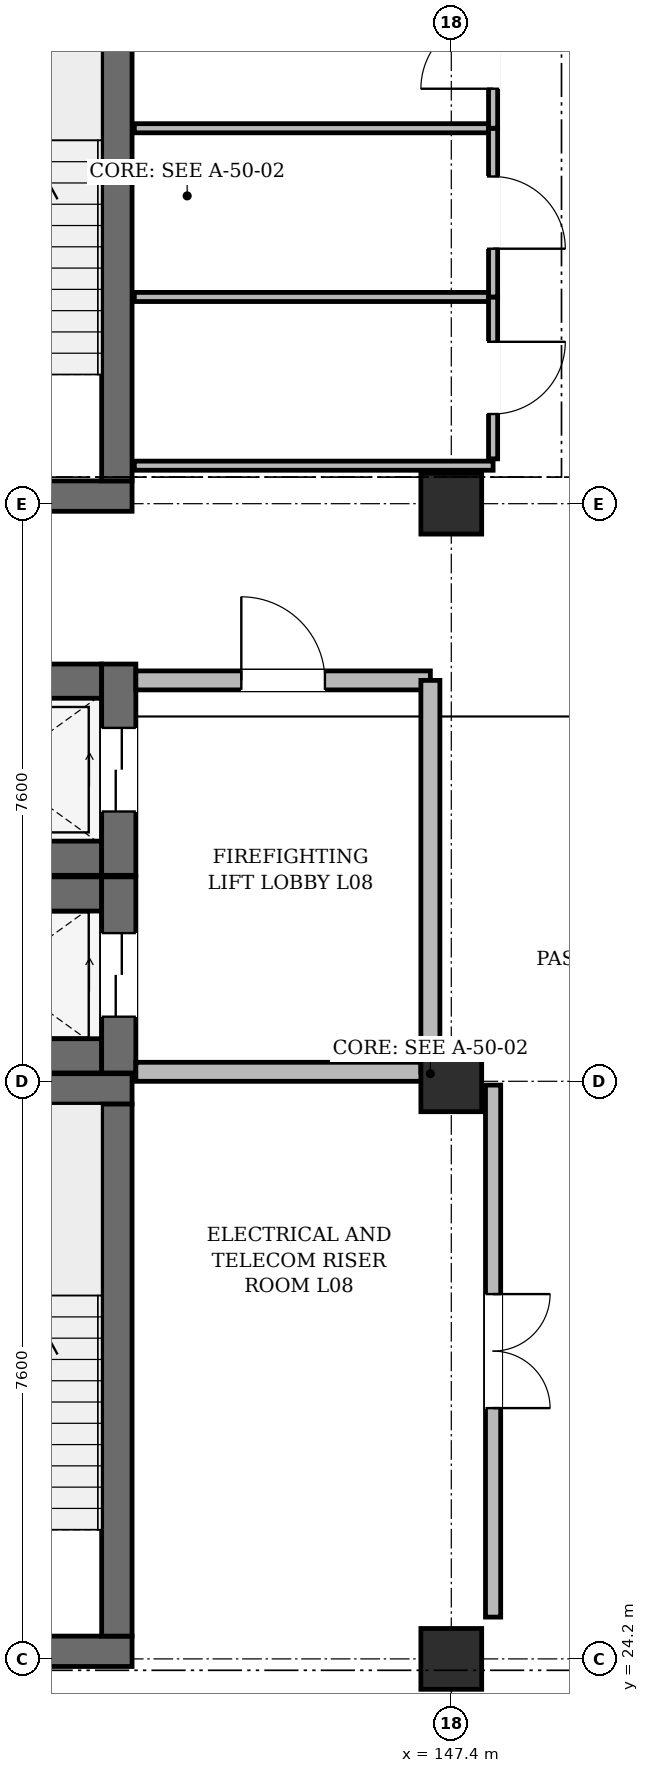
"""IFC4 building model, lengths in metres.
Left out: names, types, materials, properties, quantities, classifications, styles, units other than length and angle.
Written with IfcOpenShell. Run it as: python <this file> out.ifc"""

import sys

from ifc_helpers import new_model, si_unit, direction, frame, frame_2d, origin, origin_2d, place, context, subcontext, project, spatial, rectangle, extrude, element, fill, save


model = new_model("IFC4")
c1 = context("Model", 3, precision=1e-05, world=origin(), true_north=direction((0.0, 1.0)))
c2 = subcontext(c1, "Body", "Model", "MODEL_VIEW")
j1 = project(units=[si_unit("LENGTHUNIT", "METRE"), si_unit("PLANEANGLEUNIT", "RADIAN")], contexts=[c1])
p1 = place(None, origin())
s1 = spatial("IfcSite", under=j1, at=p1, CompositionType="ELEMENT")
p2 = place(p1, origin())
s2 = spatial("IfcBuilding", under=s1, at=p2, CompositionType="ELEMENT")
p3 = place(p2, frame((0.0, 0.0, 36.6)))
s3 = spatial("IfcBuildingStorey", under=s2, at=p3, CompositionType="ELEMENT", Elevation=36.6)
for number, where, z_axis, x_axis in (
    (1, (147.4, 24.2, 0.0), (0.0, 0.0, 1.0), (1.0, 0.0, 0.0)),
    (2, (147.4, 31.8, 0.0), (0.0, 0.0, 1.0), (1.0, 0.0, 0.0)),
    (3, (147.4, 39.4, 0.0), (0.0, 0.0, 1.0), (1.0, 0.0, 0.0)),
):
    element("IfcColumn", number, at=place(p3, frame(where, z_axis=z_axis, x_axis=x_axis)), inside=s3, PredefinedType="COLUMN", context=c2, shape_type="SweptSolid", body=[
        extrude(rectangle(XDim=0.8, YDim=0.8, at=origin_2d()), origin(), (0.0, 0.0, 1.0), 3.95),
    ])
p4 = place(p3, frame((139.4, 24.3, 0.0), z_axis=(0.0, 0.0, 1.0), x_axis=(1.0, 0.0, 0.0)))
e4 = element("IfcWall", 4, at=p4, inside=s3, PredefinedType="SHEAR", context=c2, shape_type="SweptSolid", body=[
    extrude(rectangle(XDim=3.8, YDim=0.4, at=frame_2d((1.9, 0.0))), origin(), (0.0, 0.0, 1.0), 3.95),
])
p5 = place(p4, frame((1.3, 0.0, 0.0)))
e5 = element("IfcOpeningElement", 5, at=p5, cuts=e4, PredefinedType="OPENING", context=c2, shape_type="SweptSolid", body=[
    extrude(rectangle(XDim=1.2, YDim=2.2, at=frame_2d((0.6, 1.1))), frame((0.0, 0.212, 0.0), z_axis=(0.0, -1.0, 0.0), x_axis=(1.0, 0.0, 0.0)), (0.0, 0.0, 1.0), 0.424),
])
p6 = place(p3, frame((139.4, 31.7, 0.0), z_axis=(0.0, 0.0, 1.0), x_axis=(1.0, 0.0, 0.0)))
e6 = element("IfcWall", 6, at=p6, inside=s3, PredefinedType="SHEAR", context=c2, shape_type="SweptSolid", body=[
    extrude(rectangle(XDim=3.8, YDim=0.4, at=frame_2d((1.9, 0.0))), origin(), (0.0, 0.0, 1.0), 3.95),
])
p7 = place(p3, frame((143.0, 24.5, 0.0), z_axis=(0.0, 0.0, 1.0), x_axis=(0.0, 1.0, 0.0)))
e7 = element("IfcWall", 7, at=p7, inside=s3, PredefinedType="SHEAR", context=c2, shape_type="SweptSolid", body=[
    extrude(rectangle(XDim=7.0, YDim=0.4, at=frame_2d((3.5, 0.0))), origin(), (0.0, 0.0, 1.0), 3.95),
])
p8 = place(p3, frame((139.4, 39.5, 0.0), z_axis=(0.0, 0.0, 1.0), x_axis=(1.0, 0.0, 0.0)))
e8 = element("IfcWall", 8, at=p8, inside=s3, PredefinedType="SHEAR", context=c2, shape_type="SweptSolid", body=[
    extrude(rectangle(XDim=3.8, YDim=0.4, at=frame_2d((1.9, 0.0))), origin(), (0.0, 0.0, 1.0), 3.95),
])
p9 = place(p8, frame((1.3, 0.0, 0.0)))
e9 = element("IfcOpeningElement", 9, at=p9, cuts=e8, PredefinedType="OPENING", context=c2, shape_type="SweptSolid", body=[
    extrude(rectangle(XDim=1.2, YDim=2.2, at=frame_2d((0.6, 1.1))), frame((0.0, 0.212, 0.0), z_axis=(0.0, -1.0, 0.0), x_axis=(1.0, 0.0, 0.0)), (0.0, 0.0, 1.0), 0.424),
])
p10 = place(p3, frame((143.0, 39.7, 0.0), z_axis=(0.0, 0.0, 1.0), x_axis=(0.0, 1.0, 0.0)))
e10 = element("IfcWall", 10, at=p10, inside=s3, PredefinedType="SHEAR", context=c2, shape_type="SweptSolid", body=[
    extrude(rectangle(XDim=7.0, YDim=0.4, at=frame_2d((3.5, 0.0))), origin(), (0.0, 0.0, 1.0), 3.95),
])
for number, where, z_axis, x_axis in (
    (11, (140.06, 32.135, 0.0), (0.0, 0.0, 1.0), (1.0, 0.0, 0.0)),
    (12, (140.06, 34.265, 0.0), (0.0, 0.0, 1.0), (1.0, 0.0, 0.0)),
):
    element("IfcWall", number, at=place(p3, frame(where, z_axis=z_axis, x_axis=x_axis)), inside=s3, PredefinedType="SHEAR", context=c2, shape_type="SweptSolid", body=[
        extrude(rectangle(XDim=2.74, YDim=0.45, at=frame_2d((1.37, 0.0))), origin(), (0.0, 0.0, 1.0), 3.95),
    ])
p11 = place(p3, frame((143.025, 31.91, 0.0), z_axis=(0.0, 0.0, 1.0), x_axis=(0.0, 1.0, 0.0)))
e13 = element("IfcWall", 13, at=p11, inside=s3, PredefinedType="SHEAR", context=c2, shape_type="SweptSolid", body=[
    extrude(rectangle(XDim=2.58, YDim=0.45, at=frame_2d((1.29, 0.0))), origin(), (0.0, 0.0, 1.0), 3.95),
])
p12 = place(p11, frame((0.74, 0.0, 0.0)))
e14 = element("IfcOpeningElement", 14, at=p12, cuts=e13, PredefinedType="OPENING", context=c2, shape_type="SweptSolid", body=[
    extrude(rectangle(XDim=1.1, YDim=2.2, at=frame_2d((0.55, 1.1))), frame((0.0, 0.237, 0.0), z_axis=(0.0, -1.0, 0.0), x_axis=(1.0, 0.0, 0.0)), (0.0, 0.0, 1.0), 0.474),
])
for number, where, z_axis, x_axis in (
    (15, (140.06, 34.735, 0.0), (0.0, 0.0, 1.0), (1.0, 0.0, 0.0)),
    (16, (140.06, 37.065, 0.0), (0.0, 0.0, 1.0), (1.0, 0.0, 0.0)),
):
    element("IfcWall", number, at=place(p3, frame(where, z_axis=z_axis, x_axis=x_axis)), inside=s3, PredefinedType="SHEAR", context=c2, shape_type="SweptSolid", body=[
        extrude(rectangle(XDim=2.74, YDim=0.45, at=frame_2d((1.37, 0.0))), origin(), (0.0, 0.0, 1.0), 3.95),
    ])
p13 = place(p3, frame((143.025, 34.51, 0.0), z_axis=(0.0, 0.0, 1.0), x_axis=(0.0, 1.0, 0.0)))
e17 = element("IfcWall", 17, at=p13, inside=s3, PredefinedType="SHEAR", context=c2, shape_type="SweptSolid", body=[
    extrude(rectangle(XDim=2.78, YDim=0.45, at=frame_2d((1.39, 0.0))), origin(), (0.0, 0.0, 1.0), 3.95),
])
p14 = place(p13, frame((0.84, 0.0, 0.0)))
e18 = element("IfcOpeningElement", 18, at=p14, cuts=e17, PredefinedType="OPENING", context=c2, shape_type="SweptSolid", body=[
    extrude(rectangle(XDim=1.1, YDim=2.2, at=frame_2d((0.55, 1.1))), frame((0.0, 0.237, 0.0), z_axis=(0.0, -1.0, 0.0), x_axis=(1.0, 0.0, 0.0)), (0.0, 0.0, 1.0), 0.474),
])
p15 = place(p3, frame((143.25, 37.075, 0.0), z_axis=(0.0, 0.0, 1.0), x_axis=(1.0, 0.0, 0.0)))
e19 = element("IfcWall", 19, at=p15, inside=s3, PredefinedType="SOLIDWALL", context=c2, shape_type="SweptSolid", body=[
    extrude(rectangle(XDim=3.875, YDim=0.25, at=frame_2d((1.938, 0.0))), origin(), (0.0, 0.0, 1.0), 3.805),
])
p16 = place(p15, frame((1.387, 0.0, 0.0)))
e20 = element("IfcOpeningElement", 20, at=p16, cuts=e19, PredefinedType="OPENING", context=c2, shape_type="SweptSolid", body=[
    extrude(rectangle(XDim=1.1, YDim=2.2, at=frame_2d((0.55, 1.1))), frame((0.0, 0.137, 0.0), z_axis=(0.0, -1.0, 0.0), x_axis=(1.0, 0.0, 0.0)), (0.0, 0.0, 1.0), 0.274),
])
p17 = place(p3, frame((143.25, 31.925, 0.0), z_axis=(0.0, 0.0, 1.0), x_axis=(1.0, 0.0, 0.0)))
e21 = element("IfcWall", 21, at=p17, inside=s3, PredefinedType="SOLIDWALL", context=c2, shape_type="SweptSolid", body=[
    extrude(rectangle(XDim=3.875, YDim=0.25, at=frame_2d((1.938, 0.0))), origin(), (0.0, 0.0, 1.0), 3.285),
])
p18 = place(p3, frame((147.125, 31.925, 0.0), z_axis=(0.0, 0.0, 1.0), x_axis=(0.0, 1.0, 0.0)))
e22 = element("IfcWall", 22, at=p18, inside=s3, PredefinedType="SOLIDWALL", context=c2, shape_type="SweptSolid", body=[
    extrude(rectangle(XDim=5.15, YDim=0.25, at=frame_2d((2.575, 0.0))), origin(), (0.0, 0.0, 1.0), 3.285),
])
p19 = place(p3, frame((143.23, 39.9, 0.0), z_axis=(0.0, 0.0, 1.0), x_axis=(1.0, 0.0, 0.0)))
e23 = element("IfcWall", 23, at=p19, inside=s3, PredefinedType="PARTITIONING", context=c2, shape_type="SweptSolid", body=[
    extrude(rectangle(XDim=4.72, YDim=0.12, at=frame_2d((2.36, 0.0))), origin(), (0.0, 0.0, 1.0), 3.805),
])
p20 = place(p3, frame((147.95, 31.75, 0.0), z_axis=(0.0, 0.0, 1.0), x_axis=(0.0, -1.0, 0.0)))
e24 = element("IfcWall", 24, at=p20, inside=s3, PredefinedType="PARTITIONING", context=c2, shape_type="SweptSolid", body=[
    extrude(rectangle(XDim=7.0, YDim=0.2, at=frame_2d((3.5, 0.0))), origin(), (0.0, 0.0, 1.0), 3.805),
])
p21 = place(p20, frame((2.75, 0.0, 0.0)))
e25 = element("IfcOpeningElement", 25, at=p21, cuts=e24, PredefinedType="OPENING", context=c2, shape_type="SweptSolid", body=[
    extrude(rectangle(XDim=1.5, YDim=2.2, at=frame_2d((0.75, 1.1))), frame((0.0, 0.112, 0.0), z_axis=(0.0, -1.0, 0.0), x_axis=(1.0, 0.0, 0.0)), (0.0, 0.0, 1.0), 0.224),
])
p22 = place(p3, frame((143.23, 42.12, 0.0), z_axis=(0.0, 0.0, 1.0), x_axis=(1.0, 0.0, 0.0)))
e26 = element("IfcWall", 26, at=p22, inside=s3, PredefinedType="PARTITIONING", context=c2, shape_type="SweptSolid", body=[
    extrude(rectangle(XDim=4.72, YDim=0.12, at=frame_2d((2.36, 0.0))), origin(), (0.0, 0.0, 1.0), 3.425),
])
p23 = place(p3, frame((147.95, 42.12, 0.0), z_axis=(0.0, 0.0, 1.0), x_axis=(0.0, -1.0, 0.0)))
e27 = element("IfcWall", 27, at=p23, inside=s3, PredefinedType="PARTITIONING", context=c2, shape_type="SweptSolid", body=[
    extrude(rectangle(XDim=2.13, YDim=0.12, at=frame_2d((1.065, 0.0))), origin(), (0.0, 0.0, 1.0), 3.805),
])
p24 = place(p23, frame((0.59, 0.0, 0.0)))
e28 = element("IfcOpeningElement", 28, at=p24, cuts=e27, PredefinedType="OPENING", context=c2, shape_type="SweptSolid", body=[
    extrude(rectangle(XDim=0.95, YDim=2.15, at=frame_2d((0.475, 1.075))), frame((0.0, 0.072, 0.0), z_axis=(0.0, -1.0, 0.0), x_axis=(1.0, 0.0, 0.0)), (0.0, 0.0, 1.0), 0.144),
])
p25 = place(p3, frame((143.23, 44.34, 0.0), z_axis=(0.0, 0.0, 1.0), x_axis=(1.0, 0.0, 0.0)))
e29 = element("IfcWall", 29, at=p25, inside=s3, PredefinedType="PARTITIONING", context=c2, shape_type="SweptSolid", body=[
    extrude(rectangle(XDim=4.72, YDim=0.12, at=frame_2d((2.36, 0.0))), origin(), (0.0, 0.0, 1.0), 3.375),
])
p26 = place(p3, frame((147.95, 44.34, 0.0), z_axis=(0.0, 0.0, 1.0), x_axis=(0.0, -1.0, 0.0)))
e30 = element("IfcWall", 30, at=p26, inside=s3, PredefinedType="PARTITIONING", context=c2, shape_type="SweptSolid", body=[
    extrude(rectangle(XDim=2.22, YDim=0.12, at=frame_2d((1.11, 0.0))), origin(), (0.0, 0.0, 1.0), 3.805),
])
p27 = place(p26, frame((0.635, 0.0, 0.0)))
e31 = element("IfcOpeningElement", 31, at=p27, cuts=e30, PredefinedType="OPENING", context=c2, shape_type="SweptSolid", body=[
    extrude(rectangle(XDim=0.95, YDim=2.15, at=frame_2d((0.475, 1.075))), frame((0.0, 0.072, 0.0), z_axis=(0.0, -1.0, 0.0), x_axis=(1.0, 0.0, 0.0)), (0.0, 0.0, 1.0), 0.144),
])
p28 = place(p3, frame((147.95, 46.33, 0.0), z_axis=(0.0, 0.0, 1.0), x_axis=(0.0, -1.0, 0.0)))
e32 = element("IfcWall", 32, at=p28, inside=s3, PredefinedType="PARTITIONING", context=c2, shape_type="SweptSolid", body=[
    extrude(rectangle(XDim=1.99, YDim=0.12, at=frame_2d((0.995, 0.0))), origin(), (0.0, 0.0, 1.0), 3.805),
])
p29 = place(p28, frame((0.52, 0.0, 0.0)))
e33 = element("IfcOpeningElement", 33, at=p29, cuts=e32, PredefinedType="OPENING", context=c2, shape_type="SweptSolid", body=[
    extrude(rectangle(XDim=0.95, YDim=2.15, at=frame_2d((0.475, 1.075))), frame((0.0, 0.072, 0.0), z_axis=(0.0, -1.0, 0.0), x_axis=(1.0, 0.0, 0.0)), (0.0, 0.0, 1.0), 0.144),
])
p30 = place(p12, origin())
e34 = element("IfcDoor", 34, at=p30, inside=s3, OperationType="DOUBLE_DOOR_SLIDING", PredefinedType="DOOR", context=c2, shape_type="SweptSolid", body=[
    extrude(rectangle(XDim=1.1, YDim=2.2, at=frame_2d((0.55, 1.1))), frame((0.0, 0.025, 0.0), z_axis=(0.0, -1.0, 0.0), x_axis=(1.0, 0.0, 0.0)), (0.0, 0.0, 1.0), 0.05),
])
fill(e14, e34)
p31 = place(p14, origin())
e35 = element("IfcDoor", 35, at=p31, inside=s3, OperationType="DOUBLE_DOOR_SLIDING", PredefinedType="DOOR", context=c2, shape_type="SweptSolid", body=[
    extrude(rectangle(XDim=1.1, YDim=2.2, at=frame_2d((0.55, 1.1))), frame((0.0, 0.025, 0.0), z_axis=(0.0, -1.0, 0.0), x_axis=(1.0, 0.0, 0.0)), (0.0, 0.0, 1.0), 0.05),
])
fill(e18, e35)
p32 = place(p16, origin())
e36 = element("IfcDoor", 36, at=p32, inside=s3, OperationType="SINGLE_SWING_LEFT", PredefinedType="DOOR", context=c2, shape_type="SweptSolid", body=[
    extrude(rectangle(XDim=1.1, YDim=2.2, at=frame_2d((0.55, 1.1))), frame((0.0, 0.025, 0.0), z_axis=(0.0, -1.0, 0.0), x_axis=(1.0, 0.0, 0.0)), (0.0, 0.0, 1.0), 0.05),
])
fill(e20, e36)
p33 = place(p21, origin())
e37 = element("IfcDoor", 37, at=p33, inside=s3, OperationType="DOUBLE_DOOR_SINGLE_SWING", PredefinedType="DOOR", context=c2, shape_type="SweptSolid", body=[
    extrude(rectangle(XDim=1.5, YDim=2.2, at=frame_2d((0.75, 1.1))), frame((0.0, 0.025, 0.0), z_axis=(0.0, -1.0, 0.0), x_axis=(1.0, 0.0, 0.0)), (0.0, 0.0, 1.0), 0.05),
])
fill(e25, e37)
p34 = place(p24, origin())
e38 = element("IfcDoor", 38, at=p34, inside=s3, OperationType="SINGLE_SWING_LEFT", PredefinedType="DOOR", context=c2, shape_type="SweptSolid", body=[
    extrude(rectangle(XDim=0.95, YDim=2.15, at=frame_2d((0.475, 1.075))), frame((0.0, 0.025, 0.0), z_axis=(0.0, -1.0, 0.0), x_axis=(1.0, 0.0, 0.0)), (0.0, 0.0, 1.0), 0.05),
])
fill(e28, e38)
p35 = place(p27, origin())
e39 = element("IfcDoor", 39, at=p35, inside=s3, OperationType="SINGLE_SWING_RIGHT", PredefinedType="DOOR", context=c2, shape_type="SweptSolid", body=[
    extrude(rectangle(XDim=0.95, YDim=2.15, at=frame_2d((0.475, 1.075))), frame((0.0, 0.025, 0.0), z_axis=(0.0, -1.0, 0.0), x_axis=(1.0, 0.0, 0.0)), (0.0, 0.0, 1.0), 0.05),
])
fill(e31, e39)
p36 = place(p29, frame((0.95, 0.0, 0.0), z_axis=(0.0, 0.0, 1.0), x_axis=(-1.0, 0.0, 0.0)))
e40 = element("IfcDoor", 40, at=p36, inside=s3, OperationType="SINGLE_SWING_LEFT", PredefinedType="DOOR", context=c2, shape_type="SweptSolid", body=[
    extrude(rectangle(XDim=0.95, YDim=2.15, at=frame_2d((0.475, 1.075))), frame((0.0, 0.025, 0.0), z_axis=(0.0, -1.0, 0.0), x_axis=(1.0, 0.0, 0.0)), (0.0, 0.0, 1.0), 0.05),
])
fill(e33, e40)
save(model, sys.argv[1])
